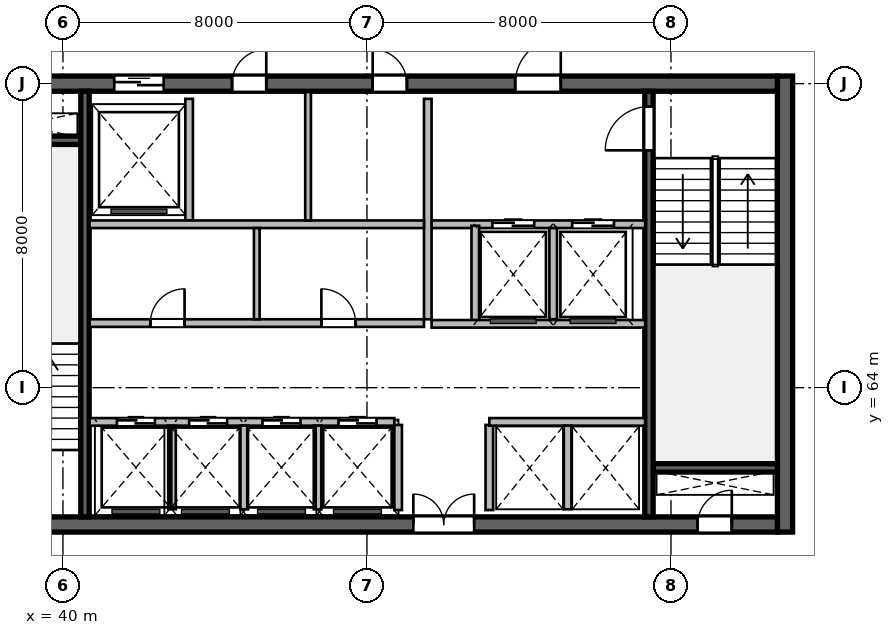
"""IFC4 building model, lengths in metres.
Left out: names, types, materials, properties, quantities, classifications, styles, units other than length and angle.
Written with IfcOpenShell. Run it as: python <this file> out.ifc"""

import sys

from ifc_helpers import new_model, si_unit, direction, frame, frame_2d, origin, place, context, subcontext, project, spatial, rectangle, extrude, source, transform, mapped, element, fill, save


model = new_model("IFC4")
c1 = context("Model", 3, precision=1e-05, world=origin(), true_north=direction((0.0, 1.0)))
c2 = subcontext(c1, "Body", "Model", "MODEL_VIEW")
j1 = project(units=[si_unit("LENGTHUNIT", "METRE"), si_unit("PLANEANGLEUNIT", "RADIAN")], contexts=[c1])
p1 = place(None, origin())
s1 = spatial("IfcSite", under=j1, at=p1, CompositionType="ELEMENT")
p2 = place(p1, origin())
s2 = spatial("IfcBuilding", under=s1, at=p2, CompositionType="ELEMENT")
p3 = place(p2, frame((0.0, 0.0, 295.2)))
s3 = spatial("IfcBuildingStorey", under=s2, at=p3, CompositionType="ELEMENT", Elevation=295.2)
m1 = source(origin(), c2, "Body", "SweptSolid", [
    extrude(rectangle(XDim=12.0, YDim=0.4, at=frame_2d((6.0, 0.0))), origin(), (0.0, 0.0, 1.0), 3.9),
])
p4 = place(p3, frame((59.0, 60.2, 0.0), z_axis=(0.0, 0.0, 1.0), x_axis=(0.0, 1.0, 0.0)))
e1 = element("IfcWall", 1, at=p4, inside=s3, PredefinedType="SHEAR", context=c2, shape_type="MappedRepresentation", body=[
    mapped(m1, transform((0.0, 0.0, 0.0), scale=1.0)),
])
m2 = source(origin(), c2, "Body", "SweptSolid", [
    extrude(rectangle(XDim=21.6, YDim=0.4, at=frame_2d((10.8, 0.0))), origin(), (0.0, 0.0, 1.0), 3.9),
])
p5 = place(p3, frame((37.2, 60.4, 0.0), z_axis=(0.0, 0.0, 1.0), x_axis=(1.0, 0.0, 0.0)))
e2 = element("IfcWall", 2, at=p5, inside=s3, PredefinedType="SHEAR", context=c2, shape_type="MappedRepresentation", body=[
    mapped(m2, transform((0.0, 0.0, 0.0), scale=1.0)),
])
p6 = place(p5, frame((1.1, 0.0, 0.0)))
e3 = element("IfcOpeningElement", 3, at=p6, cuts=e2, PredefinedType="OPENING", context=c2, shape_type="SweptSolid", body=[
    extrude(rectangle(XDim=1.15, YDim=2.15, at=frame_2d((0.575, 1.075))), frame((0.0, 0.21, 0.0), z_axis=(0.0, -1.0, 0.0), x_axis=(1.0, 0.0, 0.0)), (0.0, 0.0, 1.0), 0.42),
])
p7 = place(p5, frame((19.5, 0.0, 0.0)))
e4 = element("IfcOpeningElement", 4, at=p7, cuts=e2, PredefinedType="OPENING", context=c2, shape_type="SweptSolid", body=[
    extrude(rectangle(XDim=0.9, YDim=2.1, at=frame_2d((0.45, 1.05))), frame((0.0, 0.21, 0.0), z_axis=(0.0, -1.0, 0.0), x_axis=(1.0, 0.0, 0.0)), (0.0, 0.0, 1.0), 0.42),
])
p8 = place(p5, frame((12.02, 0.0, 0.0)))
e5 = element("IfcOpeningElement", 5, at=p8, cuts=e2, PredefinedType="OPENING", context=c2, shape_type="SweptSolid", body=[
    extrude(rectangle(XDim=1.6, YDim=2.15, at=frame_2d((0.8, 1.075))), frame((0.0, 0.21, 0.0), z_axis=(0.0, -1.0, 0.0), x_axis=(1.0, 0.0, 0.0)), (0.0, 0.0, 1.0), 0.42),
])
p9 = place(p3, frame((37.2, 72.0, 0.0), z_axis=(0.0, 0.0, 1.0), x_axis=(1.0, 0.0, 0.0)))
e6 = element("IfcWall", 6, at=p9, inside=s3, PredefinedType="SHEAR", context=c2, shape_type="MappedRepresentation", body=[
    mapped(m2, transform((0.0, 0.0, 0.0), scale=1.0)),
])
p10 = place(p9, frame((1.2, 0.0, 0.0)))
e7 = element("IfcOpeningElement", 7, at=p10, cuts=e6, PredefinedType="OPENING", context=c2, shape_type="SweptSolid", body=[
    extrude(rectangle(XDim=0.9, YDim=2.1, at=frame_2d((0.45, 1.05))), frame((0.0, 0.21, 0.0), z_axis=(0.0, -1.0, 0.0), x_axis=(1.0, 0.0, 0.0)), (0.0, 0.0, 1.0), 0.42),
])
p11 = place(p9, frame((14.7, 0.0, 0.0)))
e8 = element("IfcOpeningElement", 8, at=p11, cuts=e6, PredefinedType="OPENING", context=c2, shape_type="SweptSolid", body=[
    extrude(rectangle(XDim=1.2, YDim=2.15, at=frame_2d((0.6, 1.075))), frame((0.0, 0.21, 0.0), z_axis=(0.0, -1.0, 0.0), x_axis=(1.0, 0.0, 0.0)), (0.0, 0.0, 1.0), 0.42),
])
p12 = place(p9, frame((4.15, 0.0, 0.0)))
e9 = element("IfcOpeningElement", 9, at=p12, cuts=e6, PredefinedType="OPENING", context=c2, shape_type="SweptSolid", body=[
    extrude(rectangle(XDim=1.3, YDim=2.15, at=frame_2d((0.65, 1.075))), frame((0.0, 0.21, 0.0), z_axis=(0.0, -1.0, 0.0), x_axis=(1.0, 0.0, 0.0)), (0.0, 0.0, 1.0), 0.42),
])
p13 = place(p9, frame((7.25, 0.0, 0.0)))
e10 = element("IfcOpeningElement", 10, at=p13, cuts=e6, PredefinedType="OPENING", context=c2, shape_type="SweptSolid", body=[
    extrude(rectangle(XDim=0.9, YDim=2.1, at=frame_2d((0.45, 1.05))), frame((0.0, 0.21, 0.0), z_axis=(0.0, -1.0, 0.0), x_axis=(1.0, 0.0, 0.0)), (0.0, 0.0, 1.0), 0.42),
])
p14 = place(p9, frame((10.95, 0.0, 0.0)))
e11 = element("IfcOpeningElement", 11, at=p14, cuts=e6, PredefinedType="OPENING", context=c2, shape_type="SweptSolid", body=[
    extrude(rectangle(XDim=0.9, YDim=2.1, at=frame_2d((0.45, 1.05))), frame((0.0, 0.21, 0.0), z_axis=(0.0, -1.0, 0.0), x_axis=(1.0, 0.0, 0.0)), (0.0, 0.0, 1.0), 0.42),
])
m3 = source(origin(), c2, "Body", "SweptSolid", [
    extrude(rectangle(XDim=3.27, YDim=0.22, at=frame_2d((1.635, 0.0))), origin(), (0.0, 0.0, 1.0), 3.9),
])
for number, where, z_axis, x_axis in (
    (12, (37.2, 70.51, 0.0), (0.0, 0.0, 1.0), (1.0, 0.0, 0.0)),
    (13, (55.53, 61.89, 0.0), (0.0, 0.0, 1.0), (1.0, 0.0, 0.0)),
):
    element("IfcWall", number, at=place(p3, frame(where, z_axis=z_axis, x_axis=x_axis)), inside=s3, PredefinedType="SHEAR", context=c2, shape_type="MappedRepresentation", body=[
        mapped(m3, transform((0.0, 0.0, 0.0), scale=1.0)),
    ])
m4 = source(origin(), c2, "Body", "SweptSolid", [
    extrude(rectangle(XDim=11.2, YDim=0.22, at=frame_2d((5.6, 0.0))), origin(), (0.0, 0.0, 1.0), 3.9),
])
p15 = place(p3, frame((40.58, 60.6, 0.0), z_axis=(0.0, 0.0, 1.0), x_axis=(0.0, 1.0, 0.0)))
e14 = element("IfcWall", 14, at=p15, inside=s3, PredefinedType="SHEAR", context=c2, shape_type="MappedRepresentation", body=[
    mapped(m4, transform((0.0, 0.0, 0.0), scale=1.0)),
])
p16 = place(p3, frame((55.42, 60.6, 0.0), z_axis=(0.0, 0.0, 1.0), x_axis=(0.0, 1.0, 0.0)))
e15 = element("IfcWall", 15, at=p16, inside=s3, PredefinedType="SHEAR", context=c2, shape_type="MappedRepresentation", body=[
    mapped(m4, transform((0.0, 0.0, 0.0), scale=1.0)),
])
p17 = place(p16, frame((9.645, 0.0, 0.0)))
e16 = element("IfcOpeningElement", 16, at=p17, cuts=e15, PredefinedType="OPENING", context=c2, shape_type="SweptSolid", body=[
    extrude(rectangle(XDim=1.15, YDim=2.15, at=frame_2d((0.575, 1.075))), frame((0.0, 0.12, 0.0), z_axis=(0.0, -1.0, 0.0), x_axis=(1.0, 0.0, 0.0)), (0.0, 0.0, 1.0), 0.24),
])
m5 = source(origin(), c2, "Body", "SweptSolid", [
    extrude(rectangle(XDim=2.24, YDim=0.2, at=frame_2d((1.12, 0.0))), origin(), (0.0, 0.0, 1.0), 3.64),
])
for number, where, z_axis, x_axis in (
    (17, (48.82, 60.78, 0.0), (0.0, 0.0, 1.0), (0.0, 1.0, 0.0)),
    (18, (51.22, 60.78, 0.0), (0.0, 0.0, 1.0), (0.0, 1.0, 0.0)),
):
    element("IfcWall", number, at=place(p3, frame(where, z_axis=z_axis, x_axis=x_axis)), inside=s3, PredefinedType="SOLIDWALL", context=c2, shape_type="MappedRepresentation", body=[
        mapped(m5, transform((0.0, 0.0, 0.0), scale=1.0)),
    ])
m6 = source(origin(), c2, "Body", "SweptSolid", [
    extrude(rectangle(XDim=5.62, YDim=0.2, at=frame_2d((2.81, 0.0))), origin(), (0.0, 0.0, 1.0), 3.64),
])
p18 = place(p3, frame((49.7, 68.3, 0.0), z_axis=(0.0, 0.0, 1.0), x_axis=(1.0, 0.0, 0.0)))
e19 = element("IfcWall", 19, at=p18, inside=s3, PredefinedType="SOLIDWALL", context=c2, shape_type="MappedRepresentation", body=[
    mapped(m6, transform((0.0, 0.0, 0.0), scale=1.0)),
])
p19 = place(p18, frame((1.6, 0.0, 0.0)))
e20 = element("IfcOpeningElement", 20, at=p19, cuts=e19, PredefinedType="OPENING", context=c2, shape_type="SweptSolid", body=[
    extrude(rectangle(XDim=1.1, YDim=2.15, at=frame_2d((0.55, 1.075))), frame((0.0, 0.11, 0.0), z_axis=(0.0, -1.0, 0.0), x_axis=(1.0, 0.0, 0.0)), (0.0, 0.0, 1.0), 0.22),
])
p20 = place(p18, frame((3.7, 0.0, 0.0)))
e21 = element("IfcOpeningElement", 21, at=p20, cuts=e19, PredefinedType="OPENING", context=c2, shape_type="SweptSolid", body=[
    extrude(rectangle(XDim=1.1, YDim=2.15, at=frame_2d((0.55, 1.075))), frame((0.0, 0.11, 0.0), z_axis=(0.0, -1.0, 0.0), x_axis=(1.0, 0.0, 0.0)), (0.0, 0.0, 1.0), 0.22),
])
m7 = source(origin(), c2, "Body", "SweptSolid", [
    extrude(rectangle(XDim=5.8, YDim=0.2, at=frame_2d((2.9, 0.0))), origin(), (0.0, 0.0, 1.0), 3.64),
])
p21 = place(p3, frame((49.6, 65.8, 0.0), z_axis=(0.0, 0.0, 1.0), x_axis=(0.0, 1.0, 0.0)))
e22 = element("IfcWall", 22, at=p21, inside=s3, PredefinedType="SOLIDWALL", context=c2, shape_type="MappedRepresentation", body=[
    mapped(m7, transform((0.0, 0.0, 0.0), scale=1.0)),
])
m8 = source(origin(), c2, "Body", "SweptSolid", [
    extrude(rectangle(XDim=2.58, YDim=0.2, at=frame_2d((1.29, 0.0))), origin(), (0.0, 0.0, 1.0), 3.64),
])
p22 = place(p3, frame((50.85, 65.68, 0.0), z_axis=(0.0, 0.0, 1.0), x_axis=(0.0, 1.0, 0.0)))
e23 = element("IfcWall", 23, at=p22, inside=s3, PredefinedType="SOLIDWALL", context=c2, shape_type="MappedRepresentation", body=[
    mapped(m8, transform((0.0, 0.0, 0.0), scale=1.0)),
])
m9 = source(origin(), c2, "Body", "SweptSolid", [
    extrude(rectangle(XDim=2.4, YDim=0.2, at=frame_2d((1.2, 0.0))), origin(), (0.0, 0.0, 1.0), 3.64),
])
p23 = place(p3, frame((52.9, 65.8, 0.0), z_axis=(0.0, 0.0, 1.0), x_axis=(0.0, 1.0, 0.0)))
e24 = element("IfcWall", 24, at=p23, inside=s3, PredefinedType="SOLIDWALL", context=c2, shape_type="MappedRepresentation", body=[
    mapped(m9, transform((0.0, 0.0, 0.0), scale=1.0)),
])
p24 = place(p3, frame((49.7, 65.68, 0.0), z_axis=(0.0, 0.0, 1.0), x_axis=(1.0, 0.0, 0.0)))
e25 = element("IfcWall", 25, at=p24, inside=s3, PredefinedType="SOLIDWALL", context=c2, shape_type="MappedRepresentation", body=[
    mapped(m6, transform((0.0, 0.0, 0.0), scale=1.0)),
])
m10 = source(origin(), c2, "Body", "SweptSolid", [
    extrude(rectangle(XDim=3.2, YDim=0.2, at=frame_2d((1.6, 0.0))), origin(), (0.0, 0.0, 1.0), 3.64),
])
p25 = place(p3, frame((43.32, 68.4, 0.0), z_axis=(0.0, 0.0, 1.0), x_axis=(0.0, 1.0, 0.0)))
e26 = element("IfcWall", 26, at=p25, inside=s3, PredefinedType="SOLIDWALL", context=c2, shape_type="MappedRepresentation", body=[
    mapped(m10, transform((0.0, 0.0, 0.0), scale=1.0)),
])
m11 = source(origin(), c2, "Body", "SweptSolid", [
    extrude(rectangle(XDim=8.8, YDim=0.2, at=frame_2d((4.4, 0.0))), origin(), (0.0, 0.0, 1.0), 3.64),
])
p26 = place(p3, frame((40.7, 68.3, 0.0), z_axis=(0.0, 0.0, 1.0), x_axis=(1.0, 0.0, 0.0)))
e27 = element("IfcWall", 27, at=p26, inside=s3, PredefinedType="SOLIDWALL", context=c2, shape_type="MappedRepresentation", body=[
    mapped(m11, transform((0.0, 0.0, 0.0), scale=1.0)),
])
m12 = source(origin(), c2, "Body", "SweptSolid", [
    extrude(rectangle(XDim=3.38, YDim=0.15, at=frame_2d((1.69, 0.0))), origin(), (0.0, 0.0, 1.0), 3.64),
])
p27 = place(p3, frame((46.45, 68.4, 0.0), z_axis=(0.0, 0.0, 1.0), x_axis=(0.0, 1.0, 0.0)))
e28 = element("IfcWall", 28, at=p27, inside=s3, PredefinedType="PARTITIONING", context=c2, shape_type="MappedRepresentation", body=[
    mapped(m12, transform((0.0, 0.0, 0.0), scale=1.0)),
])
m13 = source(origin(), c2, "Body", "SweptSolid", [
    extrude(rectangle(XDim=8.02, YDim=0.2, at=frame_2d((4.01, 0.0))), origin(), (0.0, 0.0, 1.0), 3.64),
])
p28 = place(p3, frame((40.7, 63.1, 0.0), z_axis=(0.0, 0.0, 1.0), x_axis=(1.0, 0.0, 0.0)))
e29 = element("IfcWall", 29, at=p28, inside=s3, PredefinedType="SOLIDWALL", context=c2, shape_type="MappedRepresentation", body=[
    mapped(m13, transform((0.0, 0.0, 0.0), scale=1.0)),
])
p29 = place(p28, frame((0.72, 0.0, 0.0)))
e30 = element("IfcOpeningElement", 30, at=p29, cuts=e29, PredefinedType="OPENING", context=c2, shape_type="SweptSolid", body=[
    extrude(rectangle(XDim=1.0, YDim=2.15, at=frame_2d((0.5, 1.075))), frame((0.0, 0.11, 0.0), z_axis=(0.0, -1.0, 0.0), x_axis=(1.0, 0.0, 0.0)), (0.0, 0.0, 1.0), 0.22),
])
p30 = place(p28, frame((2.62, 0.0, 0.0)))
e31 = element("IfcOpeningElement", 31, at=p30, cuts=e29, PredefinedType="OPENING", context=c2, shape_type="SweptSolid", body=[
    extrude(rectangle(XDim=1.0, YDim=2.15, at=frame_2d((0.5, 1.075))), frame((0.0, 0.11, 0.0), z_axis=(0.0, -1.0, 0.0), x_axis=(1.0, 0.0, 0.0)), (0.0, 0.0, 1.0), 0.22),
])
p31 = place(p28, frame((4.55, 0.0, 0.0)))
e32 = element("IfcOpeningElement", 32, at=p31, cuts=e29, PredefinedType="OPENING", context=c2, shape_type="SweptSolid", body=[
    extrude(rectangle(XDim=1.0, YDim=2.15, at=frame_2d((0.5, 1.075))), frame((0.0, 0.11, 0.0), z_axis=(0.0, -1.0, 0.0), x_axis=(1.0, 0.0, 0.0)), (0.0, 0.0, 1.0), 0.22),
])
p32 = place(p28, frame((6.55, 0.0, 0.0)))
e33 = element("IfcOpeningElement", 33, at=p32, cuts=e29, PredefinedType="OPENING", context=c2, shape_type="SweptSolid", body=[
    extrude(rectangle(XDim=1.0, YDim=2.15, at=frame_2d((0.5, 1.075))), frame((0.0, 0.11, 0.0), z_axis=(0.0, -1.0, 0.0), x_axis=(1.0, 0.0, 0.0)), (0.0, 0.0, 1.0), 0.22),
])
m14 = source(origin(), c2, "Body", "SweptSolid", [
    extrude(rectangle(XDim=4.1, YDim=0.2, at=frame_2d((2.05, 0.0))), origin(), (0.0, 0.0, 1.0), 3.64),
])
p33 = place(p3, frame((51.22, 63.1, 0.0), z_axis=(0.0, 0.0, 1.0), x_axis=(1.0, 0.0, 0.0)))
e34 = element("IfcWall", 34, at=p33, inside=s3, PredefinedType="SOLIDWALL", context=c2, shape_type="MappedRepresentation", body=[
    mapped(m14, transform((0.0, 0.0, 0.0), scale=1.0)),
])
m15 = source(origin(), c2, "Body", "SweptSolid", [
    extrude(rectangle(XDim=2.2, YDim=0.2, at=frame_2d((1.1, 0.0))), origin(), (0.0, 0.0, 1.0), 3.64),
])
for number, where, z_axis, x_axis in (
    (35, (42.87, 60.8, 0.0), (0.0, 0.0, 1.0), (0.0, 1.0, 0.0)),
    (36, (44.77, 60.8, 0.0), (0.0, 0.0, 1.0), (0.0, 1.0, 0.0)),
    (37, (46.7, 60.8, 0.0), (0.0, 0.0, 1.0), (0.0, 1.0, 0.0)),
    (38, (53.28, 60.8, 0.0), (0.0, 0.0, 1.0), (0.0, 1.0, 0.0)),
):
    element("IfcWall", number, at=place(p3, frame(where, z_axis=z_axis, x_axis=x_axis)), inside=s3, PredefinedType="SOLIDWALL", context=c2, shape_type="MappedRepresentation", body=[
        mapped(m15, transform((0.0, 0.0, 0.0), scale=1.0)),
    ])
p34 = place(p3, frame((40.7, 65.7, 0.0), z_axis=(0.0, 0.0, 1.0), x_axis=(1.0, 0.0, 0.0)))
e39 = element("IfcWall", 39, at=p34, inside=s3, PredefinedType="SOLIDWALL", context=c2, shape_type="MappedRepresentation", body=[
    mapped(m11, transform((0.0, 0.0, 0.0), scale=1.0)),
])
p35 = place(p34, frame((1.6, 0.0, 0.0)))
e40 = element("IfcOpeningElement", 40, at=p35, cuts=e39, PredefinedType="OPENING", context=c2, shape_type="SweptSolid", body=[
    extrude(rectangle(XDim=0.9, YDim=2.1, at=frame_2d((0.45, 1.05))), frame((0.0, 0.11, 0.0), z_axis=(0.0, -1.0, 0.0), x_axis=(1.0, 0.0, 0.0)), (0.0, 0.0, 1.0), 0.22),
])
p36 = place(p34, frame((6.1, 0.0, 0.0)))
e41 = element("IfcOpeningElement", 41, at=p36, cuts=e39, PredefinedType="OPENING", context=c2, shape_type="SweptSolid", body=[
    extrude(rectangle(XDim=0.9, YDim=2.1, at=frame_2d((0.45, 1.05))), frame((0.0, 0.11, 0.0), z_axis=(0.0, -1.0, 0.0), x_axis=(1.0, 0.0, 0.0)), (0.0, 0.0, 1.0), 0.22),
])
m16 = source(origin(), c2, "Body", "SweptSolid", [
    extrude(rectangle(XDim=2.4, YDim=0.15, at=frame_2d((1.2, 0.0))), origin(), (0.0, 0.0, 1.0), 3.64),
])
p37 = place(p3, frame((45.1, 65.8, 0.0), z_axis=(0.0, 0.0, 1.0), x_axis=(0.0, 1.0, 0.0)))
e42 = element("IfcWall", 42, at=p37, inside=s3, PredefinedType="PARTITIONING", context=c2, shape_type="MappedRepresentation", body=[
    mapped(m16, transform((0.0, 0.0, 0.0), scale=1.0)),
])
m17 = source(origin(), c2, "Body", "SweptSolid", [
    extrude(rectangle(XDim=0.9, YDim=2.1, at=frame_2d((0.45, 1.05))), frame((0.0, 0.025, 0.0), z_axis=(0.0, -1.0, 0.0), x_axis=(1.0, 0.0, 0.0)), (0.0, 0.0, 1.0), 0.05),
])
p38 = place(p7, origin())
e43 = element("IfcDoor", 43, at=p38, inside=s3, OperationType="SINGLE_SWING_RIGHT", PredefinedType="DOOR", context=c2, shape_type="MappedRepresentation", body=[
    mapped(m17, transform((0.0, 0.0, 0.0), scale=1.0)),
])
fill(e4, e43)
m18 = source(origin(), c2, "Body", "SweptSolid", [
    extrude(rectangle(XDim=1.15, YDim=2.15, at=frame_2d((0.575, 1.075))), frame((0.0, 0.025, 0.0), z_axis=(0.0, -1.0, 0.0), x_axis=(1.0, 0.0, 0.0)), (0.0, 0.0, 1.0), 0.05),
])
p39 = place(p17, origin())
e44 = element("IfcDoor", 44, at=p39, inside=s3, OperationType="SINGLE_SWING_LEFT", PredefinedType="DOOR", context=c2, shape_type="MappedRepresentation", body=[
    mapped(m18, transform((0.0, 0.0, 0.0), scale=1.0)),
])
fill(e16, e44)
m19 = source(origin(), c2, "Body", "SweptSolid", [
    extrude(rectangle(XDim=1.6, YDim=2.15, at=frame_2d((0.8, 1.075))), frame((0.0, 0.025, 0.0), z_axis=(0.0, -1.0, 0.0), x_axis=(1.0, 0.0, 0.0)), (0.0, 0.0, 1.0), 0.05),
])
p40 = place(p8, origin())
e45 = element("IfcDoor", 45, at=p40, inside=s3, OperationType="DOUBLE_DOOR_SINGLE_SWING", PredefinedType="DOOR", context=c2, shape_type="MappedRepresentation", body=[
    mapped(m19, transform((0.0, 0.0, 0.0), scale=1.0)),
])
fill(e5, e45)
m20 = source(origin(), c2, "Body", "SweptSolid", [
    extrude(rectangle(XDim=1.2, YDim=2.15, at=frame_2d((0.6, 1.075))), frame((0.0, 0.025, 0.0), z_axis=(0.0, -1.0, 0.0), x_axis=(1.0, 0.0, 0.0)), (0.0, 0.0, 1.0), 0.05),
])
p41 = place(p11, origin())
e46 = element("IfcDoor", 46, at=p41, inside=s3, OperationType="SINGLE_SWING_RIGHT", PredefinedType="DOOR", context=c2, shape_type="MappedRepresentation", body=[
    mapped(m20, transform((0.0, 0.0, 0.0), scale=1.0)),
])
fill(e8, e46)
m21 = source(origin(), c2, "Body", "SweptSolid", [
    extrude(rectangle(XDim=1.1, YDim=2.15, at=frame_2d((0.55, 1.075))), frame((0.0, 0.025, 0.0), z_axis=(0.0, -1.0, 0.0), x_axis=(1.0, 0.0, 0.0)), (0.0, 0.0, 1.0), 0.05),
])
p42 = place(p19, origin())
e47 = element("IfcDoor", 47, at=p42, inside=s3, OperationType="DOUBLE_DOOR_SLIDING", PredefinedType="DOOR", context=c2, shape_type="MappedRepresentation", body=[
    mapped(m21, transform((0.0, 0.0, 0.0), scale=1.0)),
])
fill(e20, e47)
p43 = place(p20, origin())
e48 = element("IfcDoor", 48, at=p43, inside=s3, OperationType="DOUBLE_DOOR_SLIDING", PredefinedType="DOOR", context=c2, shape_type="MappedRepresentation", body=[
    mapped(m21, transform((0.0, 0.0, 0.0), scale=1.0)),
])
fill(e21, e48)
m22 = source(origin(), c2, "Body", "SweptSolid", [
    extrude(rectangle(XDim=1.3, YDim=2.15, at=frame_2d((0.65, 1.075))), frame((0.0, 0.025, 0.0), z_axis=(0.0, -1.0, 0.0), x_axis=(1.0, 0.0, 0.0)), (0.0, 0.0, 1.0), 0.05),
])
p44 = place(p12, origin())
e49 = element("IfcDoor", 49, at=p44, inside=s3, OperationType="DOUBLE_DOOR_SLIDING", PredefinedType="DOOR", context=c2, shape_type="MappedRepresentation", body=[
    mapped(m22, transform((0.0, 0.0, 0.0), scale=1.0)),
])
fill(e9, e49)
p45 = place(p13, origin())
e50 = element("IfcDoor", 50, at=p45, inside=s3, OperationType="SINGLE_SWING_RIGHT", PredefinedType="DOOR", context=c2, shape_type="MappedRepresentation", body=[
    mapped(m17, transform((0.0, 0.0, 0.0), scale=1.0)),
])
fill(e10, e50)
p46 = place(p14, origin())
e51 = element("IfcDoor", 51, at=p46, inside=s3, OperationType="SINGLE_SWING_LEFT", PredefinedType="DOOR", context=c2, shape_type="MappedRepresentation", body=[
    mapped(m17, transform((0.0, 0.0, 0.0), scale=1.0)),
])
fill(e11, e51)
m23 = source(origin(), c2, "Body", "SweptSolid", [
    extrude(rectangle(XDim=1.0, YDim=2.15, at=frame_2d((0.5, 1.075))), frame((0.0, 0.025, 0.0), z_axis=(0.0, -1.0, 0.0), x_axis=(1.0, 0.0, 0.0)), (0.0, 0.0, 1.0), 0.05),
])
p47 = place(p29, origin())
e52 = element("IfcDoor", 52, at=p47, inside=s3, OperationType="DOUBLE_DOOR_SLIDING", PredefinedType="DOOR", context=c2, shape_type="MappedRepresentation", body=[
    mapped(m23, transform((0.0, 0.0, 0.0), scale=1.0)),
])
fill(e30, e52)
p48 = place(p30, origin())
e53 = element("IfcDoor", 53, at=p48, inside=s3, OperationType="DOUBLE_DOOR_SLIDING", PredefinedType="DOOR", context=c2, shape_type="MappedRepresentation", body=[
    mapped(m23, transform((0.0, 0.0, 0.0), scale=1.0)),
])
fill(e31, e53)
p49 = place(p31, origin())
e54 = element("IfcDoor", 54, at=p49, inside=s3, OperationType="DOUBLE_DOOR_SLIDING", PredefinedType="DOOR", context=c2, shape_type="MappedRepresentation", body=[
    mapped(m23, transform((0.0, 0.0, 0.0), scale=1.0)),
])
fill(e32, e54)
p50 = place(p32, origin())
e55 = element("IfcDoor", 55, at=p50, inside=s3, OperationType="DOUBLE_DOOR_SLIDING", PredefinedType="DOOR", context=c2, shape_type="MappedRepresentation", body=[
    mapped(m23, transform((0.0, 0.0, 0.0), scale=1.0)),
])
fill(e33, e55)
p51 = place(p35, origin())
e56 = element("IfcDoor", 56, at=p51, inside=s3, OperationType="SINGLE_SWING_RIGHT", PredefinedType="DOOR", context=c2, shape_type="MappedRepresentation", body=[
    mapped(m17, transform((0.0, 0.0, 0.0), scale=1.0)),
])
fill(e40, e56)
p52 = place(p36, origin())
e57 = element("IfcDoor", 57, at=p52, inside=s3, OperationType="SINGLE_SWING_LEFT", PredefinedType="DOOR", context=c2, shape_type="MappedRepresentation", body=[
    mapped(m17, transform((0.0, 0.0, 0.0), scale=1.0)),
])
fill(e41, e57)
save(model, sys.argv[1])
